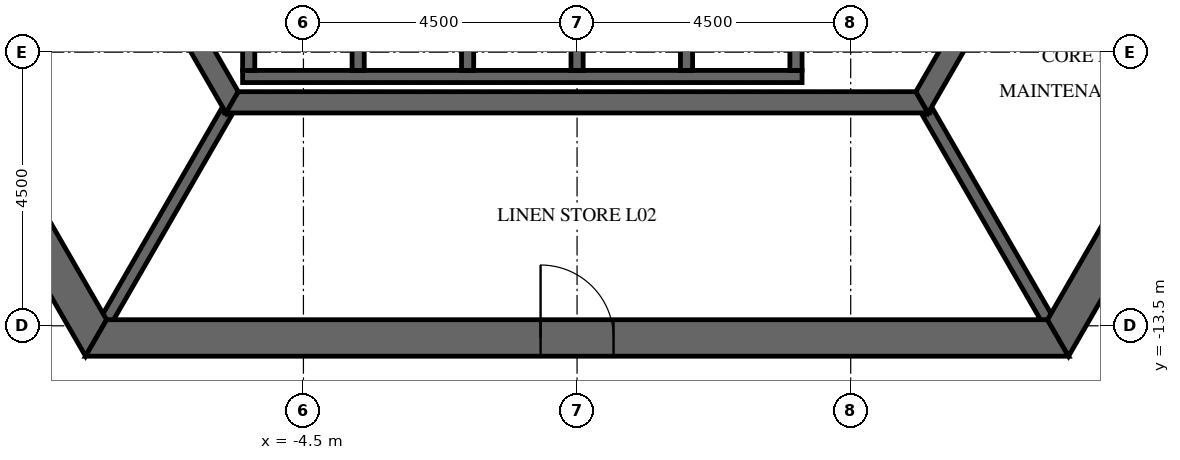
"""IFC4 building model, lengths in metres.
Left out: names, types, materials, properties, quantities, classifications, styles, units other than length and angle.
Written with IfcOpenShell. Run it as: python <this file> out.ifc"""

import sys

from ifc_helpers import new_model, si_unit, direction, frame, frame_2d, origin, place, context, subcontext, project, spatial, polyline, rectangle, outline, extrude, element, fill, save


model = new_model("IFC4")
c1 = context("Model", 3, precision=1e-05, world=origin(), true_north=direction((0.0, 1.0)))
c2 = subcontext(c1, "Body", "Model", "MODEL_VIEW")
j1 = project(units=[si_unit("LENGTHUNIT", "METRE"), si_unit("PLANEANGLEUNIT", "RADIAN")], contexts=[c1])
p1 = place(None, origin())
s1 = spatial("IfcSite", under=j1, at=p1, CompositionType="ELEMENT")
p2 = place(p1, origin())
s2 = spatial("IfcBuilding", under=s1, at=p2, CompositionType="ELEMENT")
p3 = place(p2, frame((0.0, 0.0, 15.0)))
s3 = spatial("IfcBuildingStorey", under=s2, at=p3, CompositionType="ELEMENT", Elevation=15.0)
p4 = place(p3, frame((-15.819, 0.0, -0.25), z_axis=(0.0, 0.0, 1.0), x_axis=(0.499999880136, -0.866025472988, 0.0)))
e1 = element("IfcWall", 1, at=p4, inside=s3, PredefinedType="SHEAR", context=c2, shape_type="SweptSolid", body=[
    extrude(outline(polyline([(-0.173, -0.3), (15.993, -0.3), (15.646, 0.3), (0.173, 0.3), (-0.173, -0.3)])), origin(), (0.0, 0.0, 1.0), 5.5),
])
p5 = place(p4, frame((6.981, 0.0, 0.25)))
e2 = element("IfcOpeningElement", 2, at=p5, cuts=e1, PredefinedType="OPENING", context=c2, shape_type="SweptSolid", body=[
    extrude(rectangle(XDim=1.8, YDim=2.4, at=frame_2d((0.9, 1.2))), frame((0.0, 0.31, 0.0), z_axis=(0.0, -1.0, 0.0), x_axis=(1.0, 0.0, 0.0)), (0.0, 0.0, 1.0), 0.62),
])
p6 = place(p3, frame((-7.91, -13.7, -0.25), z_axis=(0.0, 0.0, 1.0), x_axis=(1.0, 0.0, 0.0)))
e3 = element("IfcWall", 3, at=p6, inside=s3, PredefinedType="SHEAR", context=c2, shape_type="SweptSolid", body=[
    extrude(outline(polyline([(-0.173, -0.3), (15.993, -0.3), (15.646, 0.3), (0.173, 0.3), (-0.173, -0.3)])), origin(), (0.0, 0.0, 1.0), 5.5),
])
p7 = place(p6, frame((7.31, 0.0, 0.25)))
e4 = element("IfcOpeningElement", 4, at=p7, cuts=e3, PredefinedType="OPENING", context=c2, shape_type="SweptSolid", body=[
    extrude(rectangle(XDim=1.2, YDim=2.4, at=frame_2d((0.6, 1.2))), frame((0.0, 0.31, 0.0), z_axis=(0.0, -1.0, 0.0), x_axis=(1.0, 0.0, 0.0)), (0.0, 0.0, 1.0), 0.62),
])
p8 = place(p3, frame((7.91, -13.7, -0.25), z_axis=(0.0, 0.0, 1.0), x_axis=(0.499999880136, 0.866025472988, 0.0)))
e5 = element("IfcWall", 5, at=p8, inside=s3, PredefinedType="SHEAR", context=c2, shape_type="SweptSolid", body=[
    extrude(outline(polyline([(-0.173, -0.3), (15.993, -0.3), (15.646, 0.3), (0.173, 0.3), (-0.173, -0.3)])), origin(), (0.0, 0.0, 1.0), 5.5),
])
p9 = place(p8, frame((7.039, 0.0, 0.25)))
e6 = element("IfcOpeningElement", 6, at=p9, cuts=e5, PredefinedType="OPENING", context=c2, shape_type="SweptSolid", body=[
    extrude(rectangle(XDim=1.8, YDim=2.4, at=frame_2d((0.9, 1.2))), frame((0.0, 0.31, 0.0), z_axis=(0.0, -1.0, 0.0), x_axis=(1.0, 0.0, 0.0)), (0.0, 0.0, 1.0), 0.62),
])
p10 = place(p3, frame((-11.345, 0.0, -0.25), z_axis=(0.0, 0.0, 1.0), x_axis=(0.499995046907, -0.866028263435, 0.0)))
e7 = element("IfcWall", 7, at=p10, inside=s3, PredefinedType="SHEAR", context=c2, shape_type="SweptSolid", body=[
    extrude(outline(polyline([(-0.101, -0.175), (11.446, -0.175), (11.244, 0.175), (0.101, 0.175), (-0.101, -0.175)])), origin(), (0.0, 0.0, 1.0), 5.5),
])
p11 = place(p10, frame((4.744, 0.0, 0.25)))
e8 = element("IfcOpeningElement", 8, at=p11, cuts=e7, PredefinedType="OPENING", context=c2, shape_type="SweptSolid", body=[
    extrude(rectangle(XDim=1.8, YDim=2.4, at=frame_2d((0.9, 1.2))), frame((0.0, 0.185, 0.0), z_axis=(0.0, -1.0, 0.0), x_axis=(1.0, 0.0, 0.0)), (0.0, 0.0, 1.0), 0.37),
])
p12 = place(p3, frame((-5.673, -9.825, -0.25), z_axis=(0.0, 0.0, 1.0), x_axis=(1.0, 0.0, 0.0)))
e9 = element("IfcWall", 9, at=p12, inside=s3, PredefinedType="SHEAR", context=c2, shape_type="SweptSolid", body=[
    extrude(outline(polyline([(-0.101, -0.175), (11.446, -0.175), (11.244, 0.175), (0.101, 0.175), (-0.101, -0.175)])), origin(), (0.0, 0.0, 1.0), 5.5),
])
p13 = place(p3, frame((5.673, -9.825, -0.25), z_axis=(0.0, 0.0, 1.0), x_axis=(0.499995046907, 0.866028263435, 0.0)))
e10 = element("IfcWall", 10, at=p13, inside=s3, PredefinedType="SHEAR", context=c2, shape_type="SweptSolid", body=[
    extrude(outline(polyline([(-0.101, -0.175), (11.446, -0.175), (11.244, 0.175), (0.101, 0.175), (-0.101, -0.175)])), origin(), (0.0, 0.0, 1.0), 5.5),
])
p14 = place(p13, frame((4.801, 0.0, 0.25)))
e11 = element("IfcOpeningElement", 11, at=p14, cuts=e10, PredefinedType="OPENING", context=c2, shape_type="SweptSolid", body=[
    extrude(rectangle(XDim=1.8, YDim=2.4, at=frame_2d((0.9, 1.2))), frame((0.0, 0.185, 0.0), z_axis=(0.0, -1.0, 0.0), x_axis=(1.0, 0.0, 0.0)), (0.0, 0.0, 1.0), 0.37),
])
p15 = place(p3, frame((-5.5, -9.4, -0.25), z_axis=(0.0, 0.0, 1.0), x_axis=(1.0, 0.0, 0.0)))
e12 = element("IfcWall", 12, at=p15, inside=s3, PredefinedType="SHEAR", context=c2, shape_type="SweptSolid", body=[
    extrude(rectangle(XDim=9.2, YDim=0.2, at=frame_2d((4.6, 0.0))), origin(), (0.0, 0.0, 1.0), 5.5),
])
for number, where, z_axis, x_axis in (
    (13, (-5.4, -9.3, -0.25), (0.0, 0.0, 1.0), (0.0, 1.0, 0.0)),
    (14, (-3.6, -9.3, -0.25), (0.0, 0.0, 1.0), (0.0, 1.0, 0.0)),
    (15, (-1.8, -9.3, -0.25), (0.0, 0.0, 1.0), (0.0, 1.0, 0.0)),
    (16, (0.0, -9.3, -0.25), (0.0, 0.0, 1.0), (0.0, 1.0, 0.0)),
    (17, (1.8, -9.3, -0.25), (0.0, 0.0, 1.0), (0.0, 1.0, 0.0)),
    (18, (3.6, -9.3, -0.25), (0.0, 0.0, 1.0), (0.0, 1.0, 0.0)),
):
    element("IfcWall", number, at=place(p3, frame(where, z_axis=z_axis, x_axis=x_axis)), inside=s3, PredefinedType="SHEAR", context=c2, shape_type="SweptSolid", body=[
        extrude(rectangle(XDim=2.9, YDim=0.2, at=frame_2d((1.45, 0.0))), origin(), (0.0, 0.0, 1.0), 5.5),
    ])
for number, where, z_axis, x_axis in (
    (19, (-5.773, -10.0, -0.25), (0.0, 0.0, 1.0), (-0.5, -0.866, 0.0)),
    (20, (5.773, -10.0, -0.25), (0.0, 0.0, 1.0), (0.5, -0.866, 0.0)),
):
    element("IfcWall", number, at=place(p3, frame(where, z_axis=z_axis, x_axis=x_axis)), inside=s3, PredefinedType="SHEAR", context=c2, shape_type="SweptSolid", body=[
        extrude(rectangle(XDim=3.926, YDim=0.2, at=frame_2d((1.963, 0.0))), origin(), (0.0, 0.0, 1.0), 5.5),
    ])
p16 = place(p7, origin())
e21 = element("IfcDoor", 21, at=p16, inside=s3, OperationType="SINGLE_SWING_LEFT", PredefinedType="DOOR", context=c2, shape_type="SweptSolid", body=[
    extrude(rectangle(XDim=1.2, YDim=2.4, at=frame_2d((0.6, 1.2))), frame((0.0, 0.025, 0.0), z_axis=(0.0, -1.0, 0.0), x_axis=(1.0, 0.0, 0.0)), (0.0, 0.0, 1.0), 0.05),
])
fill(e4, e21)
save(model, sys.argv[1])
